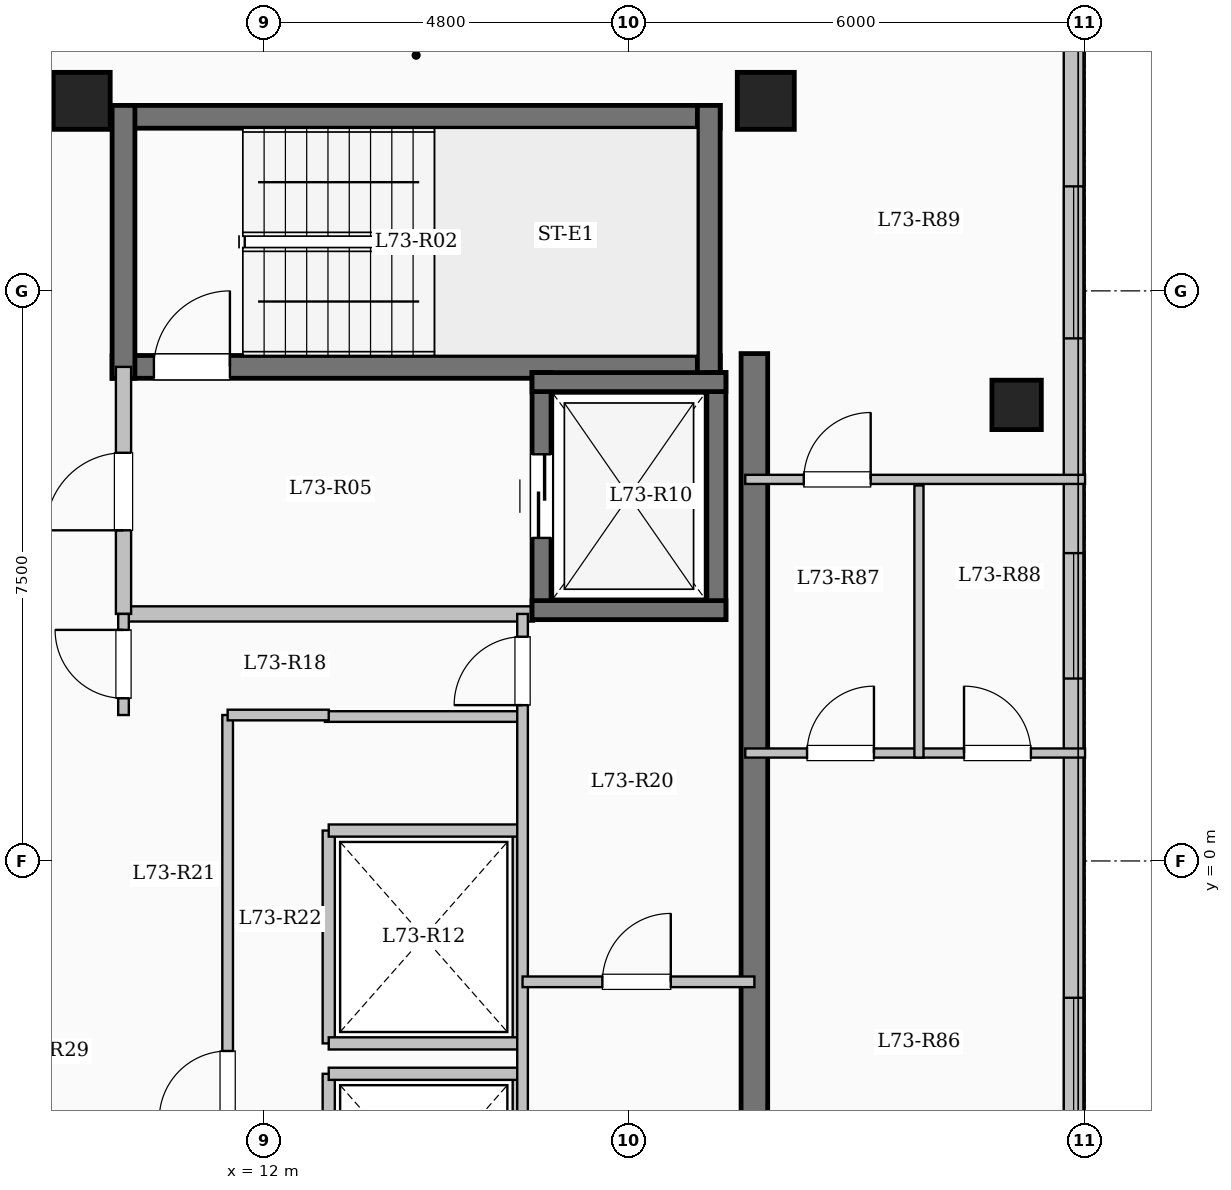
"""IFC4 building model, lengths in metres.
Left out: names, types, materials, properties, quantities, classifications, styles, units other than length and angle.
Written with IfcOpenShell. Run it as: python <this file> out.ifc"""

import sys

from ifc_helpers import new_model, si_unit, direction, frame, frame_2d, origin, origin_2d, place, context, subcontext, project, spatial, rectangle, extrude, element, fill, save


model = new_model("IFC4")
c1 = context("Model", 3, precision=1e-05, world=origin(), true_north=direction((0.0, 1.0)))
c2 = subcontext(c1, "Body", "Model", "MODEL_VIEW")
j1 = project(units=[si_unit("LENGTHUNIT", "METRE"), si_unit("PLANEANGLEUNIT", "RADIAN")], contexts=[c1])
p1 = place(None, origin())
s1 = spatial("IfcSite", under=j1, at=p1, CompositionType="ELEMENT")
p2 = place(p1, origin())
s2 = spatial("IfcBuilding", under=s1, at=p2, CompositionType="ELEMENT")
p3 = place(p2, frame((0.0, 0.0, 268.3)))
s3 = spatial("IfcBuildingStorey", under=s2, at=p3, CompositionType="ELEMENT", Elevation=268.3)
for number, where, z_axis, x_axis in (
    (1, (9.6, 10.0, 0.0), (0.0, 0.0, 1.0), (1.0, 0.0, 0.0)),
    (2, (18.6, 10.0, 0.0), (0.0, 0.0, 1.0), (1.0, 0.0, 0.0)),
):
    element("IfcColumn", number, at=place(p3, frame(where, z_axis=z_axis, x_axis=x_axis)), inside=s3, PredefinedType="COLUMN", context=c2, shape_type="SweptSolid", body=[
        extrude(rectangle(XDim=0.75, YDim=0.75, at=origin_2d()), origin(), (0.0, 0.0, 1.0), 3.35),
    ])
p4 = place(p3, frame((21.9, 6.0, 0.0), z_axis=(0.0, 0.0, 1.0), x_axis=(1.0, 0.0, 0.0)))
e3 = element("IfcColumn", 3, at=p4, inside=s3, PredefinedType="COLUMN", context=c2, shape_type="SweptSolid", body=[
    extrude(rectangle(XDim=0.65, YDim=0.65, at=origin_2d()), origin(), (0.0, 0.0, 1.0), 3.35),
])
p5 = place(p3, frame((22.65, 17.55, 0.0), z_axis=(0.0, 0.0, 1.0), x_axis=(0.0, -1.0, 0.0)))
e4 = element("IfcWall", 4, at=p5, inside=s3, PredefinedType="SOLIDWALL", context=c2, shape_type="SweptSolid", body=[
    extrude(rectangle(XDim=35.1, YDim=0.26, at=frame_2d((17.55, 0.0))), origin(), (0.0, 0.0, 1.0), 3.05),
])
p6 = place(p5, frame((1.525, 0.0, 0.9)))
e5 = element("IfcOpeningElement", 5, at=p6, cuts=e4, PredefinedType="OPENING", context=c2, shape_type="SweptSolid", body=[
    extrude(rectangle(XDim=2.0, YDim=1.7, at=frame_2d((1.0, 0.85))), frame((0.0, 0.14, 0.0), z_axis=(0.0, -1.0, 0.0), x_axis=(1.0, 0.0, 0.0)), (0.0, 0.0, 1.0), 0.28),
])
p7 = place(p5, frame((5.425, 0.0, 0.95)))
e6 = element("IfcOpeningElement", 6, at=p7, cuts=e4, PredefinedType="OPENING", context=c2, shape_type="SweptSolid", body=[
    extrude(rectangle(XDim=1.0, YDim=1.5, at=frame_2d((0.5, 0.75))), frame((0.0, 0.14, 0.0), z_axis=(0.0, -1.0, 0.0), x_axis=(1.0, 0.0, 0.0)), (0.0, 0.0, 1.0), 0.28),
])
p8 = place(p5, frame((8.675, 0.0, 0.9)))
e7 = element("IfcOpeningElement", 7, at=p8, cuts=e4, PredefinedType="OPENING", context=c2, shape_type="SweptSolid", body=[
    extrude(rectangle(XDim=2.0, YDim=1.7, at=frame_2d((1.0, 0.85))), frame((0.0, 0.14, 0.0), z_axis=(0.0, -1.0, 0.0), x_axis=(1.0, 0.0, 0.0)), (0.0, 0.0, 1.0), 0.28),
])
p9 = place(p5, frame((13.5, 0.0, 0.9)))
e8 = element("IfcOpeningElement", 8, at=p9, cuts=e4, PredefinedType="OPENING", context=c2, shape_type="SweptSolid", body=[
    extrude(rectangle(XDim=1.65, YDim=1.6, at=frame_2d((0.825, 0.8))), frame((0.0, 0.14, 0.0), z_axis=(0.0, -1.0, 0.0), x_axis=(1.0, 0.0, 0.0)), (0.0, 0.0, 1.0), 0.28),
])
p10 = place(p5, frame((19.35, 0.0, 0.9)))
e9 = element("IfcOpeningElement", 9, at=p10, cuts=e4, PredefinedType="OPENING", context=c2, shape_type="SweptSolid", body=[
    extrude(rectangle(XDim=2.2, YDim=1.75, at=frame_2d((1.1, 0.875))), frame((0.0, 0.14, 0.0), z_axis=(0.0, -1.0, 0.0), x_axis=(1.0, 0.0, 0.0)), (0.0, 0.0, 1.0), 0.28),
])
p11 = place(p5, frame((25.275, 0.0, 0.95)))
e10 = element("IfcOpeningElement", 10, at=p11, cuts=e4, PredefinedType="OPENING", context=c2, shape_type="SweptSolid", body=[
    extrude(rectangle(XDim=1.2, YDim=1.5, at=frame_2d((0.6, 0.75))), frame((0.0, 0.14, 0.0), z_axis=(0.0, -1.0, 0.0), x_axis=(1.0, 0.0, 0.0)), (0.0, 0.0, 1.0), 0.28),
])
p12 = place(p5, frame((29.925, 0.0, 0.9)))
e11 = element("IfcOpeningElement", 11, at=p12, cuts=e4, PredefinedType="OPENING", context=c2, shape_type="SweptSolid", body=[
    extrude(rectangle(XDim=2.2, YDim=1.75, at=frame_2d((1.1, 0.875))), frame((0.0, 0.14, 0.0), z_axis=(0.0, -1.0, 0.0), x_axis=(1.0, 0.0, 0.0)), (0.0, 0.0, 1.0), 0.28),
])
p13 = place(p3, frame((10.0, 9.79, 0.0), z_axis=(0.0, 0.0, 1.0), x_axis=(1.0, 0.0, 0.0)))
e12 = element("IfcWall", 12, at=p13, inside=s3, PredefinedType="SHEAR", context=c2, shape_type="SweptSolid", body=[
    extrude(rectangle(XDim=8.0, YDim=0.3, at=frame_2d((4.0, 0.0))), origin(), (0.0, 0.0, 1.0), 3.35),
])
p14 = place(p3, frame((10.0, 6.5, 0.0), z_axis=(0.0, 0.0, 1.0), x_axis=(1.0, 0.0, 0.0)))
e13 = element("IfcWall", 13, at=p14, inside=s3, PredefinedType="SHEAR", context=c2, shape_type="SweptSolid", body=[
    extrude(rectangle(XDim=8.0, YDim=0.3, at=frame_2d((4.0, 0.0))), origin(), (0.0, 0.0, 1.0), 3.35),
])
p15 = place(p14, frame((0.55, 0.0, 0.0)))
e14 = element("IfcOpeningElement", 14, at=p15, cuts=e13, PredefinedType="OPENING", context=c2, shape_type="SweptSolid", body=[
    extrude(rectangle(XDim=1.0, YDim=2.15, at=frame_2d((0.5, 1.075))), frame((0.0, 0.16, 0.0), z_axis=(0.0, -1.0, 0.0), x_axis=(1.0, 0.0, 0.0)), (0.0, 0.0, 1.0), 0.32),
])
for number, where, z_axis, x_axis in (
    (15, (10.15, 6.35, 0.0), (0.0, 0.0, 1.0), (0.0, 1.0, 0.0)),
    (16, (17.85, 6.35, 0.0), (0.0, 0.0, 1.0), (0.0, 1.0, 0.0)),
):
    element("IfcWall", number, at=place(p3, frame(where, z_axis=z_axis, x_axis=x_axis)), inside=s3, PredefinedType="SHEAR", context=c2, shape_type="SweptSolid", body=[
        extrude(rectangle(XDim=3.59, YDim=0.3, at=frame_2d((1.795, 0.0))), origin(), (0.0, 0.0, 1.0), 3.35),
    ])
p16 = place(p3, frame((10.15, 3.25, 0.0), z_axis=(0.0, 0.0, 1.0), x_axis=(1.0, 0.0, 0.0)))
e17 = element("IfcWall", 17, at=p16, inside=s3, PredefinedType="SOLIDWALL", context=c2, shape_type="SweptSolid", body=[
    extrude(rectangle(XDim=5.4, YDim=0.2, at=frame_2d((2.7, 0.0))), origin(), (0.0, 0.0, 1.0), 3.05),
])
p17 = place(p3, frame((10.15, 3.25, 0.0), z_axis=(0.0, 0.0, 1.0), x_axis=(0.0, 1.0, 0.0)))
e18 = element("IfcWall", 18, at=p17, inside=s3, PredefinedType="SOLIDWALL", context=c2, shape_type="SweptSolid", body=[
    extrude(rectangle(XDim=3.25, YDim=0.2, at=frame_2d((1.625, 0.0))), origin(), (0.0, 0.0, 1.0), 3.05),
])
p18 = place(p17, frame((1.1, 0.0, 0.0)))
e19 = element("IfcOpeningElement", 19, at=p18, cuts=e18, PredefinedType="OPENING", context=c2, shape_type="SweptSolid", body=[
    extrude(rectangle(XDim=1.02, YDim=2.15, at=frame_2d((0.51, 1.075))), frame((0.0, 0.11, 0.0), z_axis=(0.0, -1.0, 0.0), x_axis=(1.0, 0.0, 0.0)), (0.0, 0.0, 1.0), 0.22),
])
p19 = place(p3, frame((15.65, 3.175, 0.0), z_axis=(0.0, 0.0, 1.0), x_axis=(0.0, 1.0, 0.0)))
e20 = element("IfcWall", 20, at=p19, inside=s3, PredefinedType="SHEAR", context=c2, shape_type="SweptSolid", body=[
    extrude(rectangle(XDim=3.25, YDim=0.25, at=frame_2d((1.625, 0.0))), origin(), (0.0, 0.0, 1.0), 3.35),
])
p20 = place(p19, frame((1.075, 0.0, 0.0)))
e21 = element("IfcOpeningElement", 21, at=p20, cuts=e20, PredefinedType="OPENING", context=c2, shape_type="SweptSolid", body=[
    extrude(rectangle(XDim=1.1, YDim=2.15, at=frame_2d((0.55, 1.075))), frame((0.0, 0.135, 0.0), z_axis=(0.0, -1.0, 0.0), x_axis=(1.0, 0.0, 0.0)), (0.0, 0.0, 1.0), 0.27),
])
p21 = place(p3, frame((17.95, 3.175, 0.0), z_axis=(0.0, 0.0, 1.0), x_axis=(0.0, 1.0, 0.0)))
e22 = element("IfcWall", 22, at=p21, inside=s3, PredefinedType="SHEAR", context=c2, shape_type="SweptSolid", body=[
    extrude(rectangle(XDim=3.25, YDim=0.25, at=frame_2d((1.625, 0.0))), origin(), (0.0, 0.0, 1.0), 3.35),
])
for number, where, z_axis, x_axis in (
    (23, (15.525, 3.3, 0.0), (0.0, 0.0, 1.0), (1.0, 0.0, 0.0)),
    (24, (15.525, 6.3, 0.0), (0.0, 0.0, 1.0), (1.0, 0.0, 0.0)),
):
    element("IfcWall", number, at=place(p3, frame(where, z_axis=z_axis, x_axis=x_axis)), inside=s3, PredefinedType="SHEAR", context=c2, shape_type="SweptSolid", body=[
        extrude(rectangle(XDim=2.55, YDim=0.25, at=frame_2d((1.275, 0.0))), origin(), (0.0, 0.0, 1.0), 3.35),
    ])
for number, where, z_axis, x_axis in (
    (25, (12.85, -5.6, 0.0), (0.0, 0.0, 1.0), (0.0, 1.0, 0.0)),
    (26, (15.35, -5.6, 0.0), (0.0, 0.0, 1.0), (0.0, 1.0, 0.0)),
):
    element("IfcWall", number, at=place(p3, frame(where, z_axis=z_axis, x_axis=x_axis)), inside=s3, PredefinedType="SOLIDWALL", context=c2, shape_type="SweptSolid", body=[
        extrude(rectangle(XDim=2.8, YDim=0.16, at=frame_2d((1.4, 0.0))), origin(), (0.0, 0.0, 1.0), 3.05),
    ])
p22 = place(p3, frame((12.85, -2.8, 0.0), z_axis=(0.0, 0.0, 1.0), x_axis=(1.0, 0.0, 0.0)))
e27 = element("IfcWall", 27, at=p22, inside=s3, PredefinedType="SOLIDWALL", context=c2, shape_type="SweptSolid", body=[
    extrude(rectangle(XDim=2.5, YDim=0.16, at=frame_2d((1.25, 0.0))), origin(), (0.0, 0.0, 1.0), 3.05),
])
for number, where, z_axis, x_axis in (
    (28, (12.85, -2.4, 0.0), (0.0, 0.0, 1.0), (0.0, 1.0, 0.0)),
    (29, (15.35, -2.4, 0.0), (0.0, 0.0, 1.0), (0.0, 1.0, 0.0)),
):
    element("IfcWall", number, at=place(p3, frame(where, z_axis=z_axis, x_axis=x_axis)), inside=s3, PredefinedType="SOLIDWALL", context=c2, shape_type="SweptSolid", body=[
        extrude(rectangle(XDim=2.8, YDim=0.16, at=frame_2d((1.4, 0.0))), origin(), (0.0, 0.0, 1.0), 3.05),
    ])
for number, where, z_axis, x_axis in (
    (30, (12.85, -2.4, 0.0), (0.0, 0.0, 1.0), (1.0, 0.0, 0.0)),
    (31, (12.85, 0.4, 0.0), (0.0, 0.0, 1.0), (1.0, 0.0, 0.0)),
):
    element("IfcWall", number, at=place(p3, frame(where, z_axis=z_axis, x_axis=x_axis)), inside=s3, PredefinedType="SOLIDWALL", context=c2, shape_type="SweptSolid", body=[
        extrude(rectangle(XDim=2.5, YDim=0.16, at=frame_2d((1.25, 0.0))), origin(), (0.0, 0.0, 1.0), 3.05),
    ])
p23 = place(p3, frame((18.45, -7.375, 0.0), z_axis=(0.0, 0.0, 1.0), x_axis=(0.0, 1.0, 0.0)))
e32 = element("IfcWall", 32, at=p23, inside=s3, PredefinedType="SHEAR", context=c2, shape_type="SweptSolid", body=[
    extrude(rectangle(XDim=14.05, YDim=0.35, at=frame_2d((7.025, 0.0))), origin(), (0.0, 0.0, 1.0), 3.35),
])
p24 = place(p3, frame((12.8, 1.9, 0.0), z_axis=(0.0, 0.0, 1.0), x_axis=(1.0, 0.0, 0.0)))
e33 = element("IfcWall", 33, at=p24, inside=s3, PredefinedType="PARTITIONING", context=c2, shape_type="SweptSolid", body=[
    extrude(rectangle(XDim=2.6, YDim=0.14, at=frame_2d((1.3, 0.0))), origin(), (0.0, 0.0, 1.0), 3.05),
])
p25 = place(p3, frame((10.15, 1.92, 0.0), z_axis=(0.0, 0.0, 1.0), x_axis=(0.0, 1.0, 0.0)))
e34 = element("IfcWall", 34, at=p25, inside=s3, PredefinedType="PARTITIONING", context=c2, shape_type="SweptSolid", body=[
    extrude(rectangle(XDim=1.33, YDim=0.14, at=frame_2d((0.665, 0.0))), origin(), (0.0, 0.0, 1.0), 3.05),
])
p26 = place(p25, frame((0.22, 0.0, 0.0)))
e35 = element("IfcOpeningElement", 35, at=p26, cuts=e34, PredefinedType="OPENING", context=c2, shape_type="SweptSolid", body=[
    extrude(rectangle(XDim=0.9, YDim=2.08, at=frame_2d((0.45, 1.04))), frame((0.0, 0.08, 0.0), z_axis=(0.0, -1.0, 0.0), x_axis=(1.0, 0.0, 0.0)), (0.0, 0.0, 1.0), 0.16),
])
p27 = place(p3, frame((15.4, -7.2, 0.0), z_axis=(0.0, 0.0, 1.0), x_axis=(0.0, 1.0, 0.0)))
e36 = element("IfcWall", 36, at=p27, inside=s3, PredefinedType="PARTITIONING", context=c2, shape_type="SweptSolid", body=[
    extrude(rectangle(XDim=10.45, YDim=0.14, at=frame_2d((5.225, 0.0))), origin(), (0.0, 0.0, 1.0), 3.05),
])
p28 = place(p27, frame((9.25, 0.0, 0.0)))
e37 = element("IfcOpeningElement", 37, at=p28, cuts=e36, PredefinedType="OPENING", context=c2, shape_type="SweptSolid", body=[
    extrude(rectangle(XDim=0.9, YDim=2.08, at=frame_2d((0.45, 1.04))), frame((0.0, 0.08, 0.0), z_axis=(0.0, -1.0, 0.0), x_axis=(1.0, 0.0, 0.0)), (0.0, 0.0, 1.0), 0.16),
])
p29 = place(p3, frame((15.4, -1.59, 0.0), z_axis=(0.0, 0.0, 1.0), x_axis=(1.0, 0.0, 0.0)))
e38 = element("IfcWall", 38, at=p29, inside=s3, PredefinedType="PARTITIONING", context=c2, shape_type="SweptSolid", body=[
    extrude(rectangle(XDim=3.05, YDim=0.14, at=frame_2d((1.525, 0.0))), origin(), (0.0, 0.0, 1.0), 3.05),
])
p30 = place(p29, frame((1.05, 0.0, 0.0)))
e39 = element("IfcOpeningElement", 39, at=p30, cuts=e38, PredefinedType="OPENING", context=c2, shape_type="SweptSolid", body=[
    extrude(rectangle(XDim=0.9, YDim=2.08, at=frame_2d((0.45, 1.04))), frame((0.0, 0.08, 0.0), z_axis=(0.0, -1.0, 0.0), x_axis=(1.0, 0.0, 0.0)), (0.0, 0.0, 1.0), 0.16),
])
p31 = place(p3, frame((11.52, -7.2, 0.0), z_axis=(0.0, 0.0, 1.0), x_axis=(0.0, 1.0, 0.0)))
e40 = element("IfcWall", 40, at=p31, inside=s3, PredefinedType="PARTITIONING", context=c2, shape_type="SweptSolid", body=[
    extrude(rectangle(XDim=9.12, YDim=0.14, at=frame_2d((4.56, 0.0))), origin(), (0.0, 0.0, 1.0), 3.05),
])
p32 = place(p31, frame((3.8, 0.0, 0.0)))
e41 = element("IfcOpeningElement", 41, at=p32, cuts=e40, PredefinedType="OPENING", context=c2, shape_type="SweptSolid", body=[
    extrude(rectangle(XDim=0.9, YDim=2.08, at=frame_2d((0.45, 1.04))), frame((0.0, 0.08, 0.0), z_axis=(0.0, -1.0, 0.0), x_axis=(1.0, 0.0, 0.0)), (0.0, 0.0, 1.0), 0.16),
])
p33 = place(p3, frame((11.52, 1.92, 0.0), z_axis=(0.0, 0.0, 1.0), x_axis=(1.0, 0.0, 0.0)))
e42 = element("IfcWall", 42, at=p33, inside=s3, PredefinedType="PARTITIONING", context=c2, shape_type="SweptSolid", body=[
    extrude(rectangle(XDim=1.33, YDim=0.14, at=frame_2d((0.665, 0.0))), origin(), (0.0, 0.0, 1.0), 3.05),
])
p34 = place(p3, frame((18.33, 1.42, 0.0), z_axis=(0.0, 0.0, 1.0), x_axis=(1.0, 0.0, 0.0)))
e43 = element("IfcWall", 43, at=p34, inside=s3, PredefinedType="PARTITIONING", context=c2, shape_type="SweptSolid", body=[
    extrude(rectangle(XDim=4.47, YDim=0.12, at=frame_2d((2.235, 0.0))), origin(), (0.0, 0.0, 1.0), 3.05),
])
p35 = place(p34, frame((0.813, 0.0, 0.0)))
e44 = element("IfcOpeningElement", 44, at=p35, cuts=e43, PredefinedType="OPENING", context=c2, shape_type="SweptSolid", body=[
    extrude(rectangle(XDim=0.88, YDim=2.1, at=frame_2d((0.44, 1.05))), frame((0.0, 0.07, 0.0), z_axis=(0.0, -1.0, 0.0), x_axis=(1.0, 0.0, 0.0)), (0.0, 0.0, 1.0), 0.14),
])
p36 = place(p34, frame((2.878, 0.0, 0.0)))
e45 = element("IfcOpeningElement", 45, at=p36, cuts=e43, PredefinedType="OPENING", context=c2, shape_type="SweptSolid", body=[
    extrude(rectangle(XDim=0.88, YDim=2.1, at=frame_2d((0.44, 1.05))), frame((0.0, 0.07, 0.0), z_axis=(0.0, -1.0, 0.0), x_axis=(1.0, 0.0, 0.0)), (0.0, 0.0, 1.0), 0.14),
])
p37 = place(p3, frame((18.33, 5.02, 0.0), z_axis=(0.0, 0.0, 1.0), x_axis=(1.0, 0.0, 0.0)))
e46 = element("IfcWall", 46, at=p37, inside=s3, PredefinedType="PARTITIONING", context=c2, shape_type="SweptSolid", body=[
    extrude(rectangle(XDim=4.47, YDim=0.12, at=frame_2d((2.235, 0.0))), origin(), (0.0, 0.0, 1.0), 3.05),
])
p38 = place(p37, frame((0.77, 0.0, 0.0)))
e47 = element("IfcOpeningElement", 47, at=p38, cuts=e46, PredefinedType="OPENING", context=c2, shape_type="SweptSolid", body=[
    extrude(rectangle(XDim=0.88, YDim=2.1, at=frame_2d((0.44, 1.05))), frame((0.0, 0.07, 0.0), z_axis=(0.0, -1.0, 0.0), x_axis=(1.0, 0.0, 0.0)), (0.0, 0.0, 1.0), 0.14),
])
p39 = place(p3, frame((20.615, 1.36, 0.0), z_axis=(0.0, 0.0, 1.0), x_axis=(0.0, 1.0, 0.0)))
e48 = element("IfcWall", 48, at=p39, inside=s3, PredefinedType="PARTITIONING", context=c2, shape_type="SweptSolid", body=[
    extrude(rectangle(XDim=3.58, YDim=0.12, at=frame_2d((1.79, 0.0))), origin(), (0.0, 0.0, 1.0), 3.05),
])
p40 = place(p8, origin())
e49 = element("IfcWindow", 49, at=p40, inside=s3, PartitioningType="SINGLE_PANEL", PredefinedType="WINDOW", context=c2, shape_type="SweptSolid", body=[
    extrude(rectangle(XDim=2.0, YDim=1.7, at=frame_2d((1.0, 0.85))), frame((0.0, 0.03, 0.0), z_axis=(0.0, -1.0, 0.0), x_axis=(1.0, 0.0, 0.0)), (0.0, 0.0, 1.0), 0.06),
])
fill(e7, e49)
p41 = place(p9, origin())
e50 = element("IfcWindow", 50, at=p41, inside=s3, PartitioningType="SINGLE_PANEL", PredefinedType="WINDOW", context=c2, shape_type="SweptSolid", body=[
    extrude(rectangle(XDim=1.65, YDim=1.6, at=frame_2d((0.825, 0.8))), frame((0.0, 0.03, 0.0), z_axis=(0.0, -1.0, 0.0), x_axis=(1.0, 0.0, 0.0)), (0.0, 0.0, 1.0), 0.06),
])
fill(e8, e50)
p42 = place(p10, origin())
e51 = element("IfcWindow", 51, at=p42, inside=s3, PartitioningType="SINGLE_PANEL", PredefinedType="WINDOW", context=c2, shape_type="SweptSolid", body=[
    extrude(rectangle(XDim=2.2, YDim=1.75, at=frame_2d((1.1, 0.875))), frame((0.0, 0.03, 0.0), z_axis=(0.0, -1.0, 0.0), x_axis=(1.0, 0.0, 0.0)), (0.0, 0.0, 1.0), 0.06),
])
fill(e9, e51)
p43 = place(p15, origin())
e52 = element("IfcDoor", 52, at=p43, inside=s3, OperationType="SINGLE_SWING_RIGHT", PredefinedType="DOOR", context=c2, shape_type="SweptSolid", body=[
    extrude(rectangle(XDim=1.0, YDim=2.15, at=frame_2d((0.5, 1.075))), frame((0.0, 0.025, 0.0), z_axis=(0.0, -1.0, 0.0), x_axis=(1.0, 0.0, 0.0)), (0.0, 0.0, 1.0), 0.05),
])
fill(e14, e52)
p44 = place(p18, origin())
e53 = element("IfcDoor", 53, at=p44, inside=s3, OperationType="SINGLE_SWING_LEFT", PredefinedType="DOOR", context=c2, shape_type="SweptSolid", body=[
    extrude(rectangle(XDim=1.02, YDim=2.15, at=frame_2d((0.51, 1.075))), frame((0.0, 0.025, 0.0), z_axis=(0.0, -1.0, 0.0), x_axis=(1.0, 0.0, 0.0)), (0.0, 0.0, 1.0), 0.05),
])
fill(e19, e53)
p45 = place(p20, origin())
e54 = element("IfcDoor", 54, at=p45, inside=s3, OperationType="SLIDING_TO_LEFT", PredefinedType="DOOR", context=c2, shape_type="SweptSolid", body=[
    extrude(rectangle(XDim=1.1, YDim=2.15, at=frame_2d((0.55, 1.075))), frame((0.0, 0.025, 0.0), z_axis=(0.0, -1.0, 0.0), x_axis=(1.0, 0.0, 0.0)), (0.0, 0.0, 1.0), 0.05),
])
fill(e21, e54)
p46 = place(p26, origin())
e55 = element("IfcDoor", 55, at=p46, inside=s3, OperationType="SINGLE_SWING_RIGHT", PredefinedType="DOOR", context=c2, shape_type="SweptSolid", body=[
    extrude(rectangle(XDim=0.9, YDim=2.08, at=frame_2d((0.45, 1.04))), frame((0.0, 0.025, 0.0), z_axis=(0.0, -1.0, 0.0), x_axis=(1.0, 0.0, 0.0)), (0.0, 0.0, 1.0), 0.05),
])
fill(e35, e55)
p47 = place(p28, origin())
e56 = element("IfcDoor", 56, at=p47, inside=s3, OperationType="SINGLE_SWING_LEFT", PredefinedType="DOOR", context=c2, shape_type="SweptSolid", body=[
    extrude(rectangle(XDim=0.9, YDim=2.08, at=frame_2d((0.45, 1.04))), frame((0.0, 0.025, 0.0), z_axis=(0.0, -1.0, 0.0), x_axis=(1.0, 0.0, 0.0)), (0.0, 0.0, 1.0), 0.05),
])
fill(e37, e56)
p48 = place(p30, origin())
e57 = element("IfcDoor", 57, at=p48, inside=s3, OperationType="SINGLE_SWING_RIGHT", PredefinedType="DOOR", context=c2, shape_type="SweptSolid", body=[
    extrude(rectangle(XDim=0.9, YDim=2.08, at=frame_2d((0.45, 1.04))), frame((0.0, 0.025, 0.0), z_axis=(0.0, -1.0, 0.0), x_axis=(1.0, 0.0, 0.0)), (0.0, 0.0, 1.0), 0.05),
])
fill(e39, e57)
p49 = place(p32, origin())
e58 = element("IfcDoor", 58, at=p49, inside=s3, OperationType="SINGLE_SWING_LEFT", PredefinedType="DOOR", context=c2, shape_type="SweptSolid", body=[
    extrude(rectangle(XDim=0.9, YDim=2.08, at=frame_2d((0.45, 1.04))), frame((0.0, 0.025, 0.0), z_axis=(0.0, -1.0, 0.0), x_axis=(1.0, 0.0, 0.0)), (0.0, 0.0, 1.0), 0.05),
])
fill(e41, e58)
p50 = place(p35, origin())
e59 = element("IfcDoor", 59, at=p50, inside=s3, OperationType="SINGLE_SWING_RIGHT", PredefinedType="DOOR", context=c2, shape_type="SweptSolid", body=[
    extrude(rectangle(XDim=0.88, YDim=2.1, at=frame_2d((0.44, 1.05))), frame((0.0, 0.025, 0.0), z_axis=(0.0, -1.0, 0.0), x_axis=(1.0, 0.0, 0.0)), (0.0, 0.0, 1.0), 0.05),
])
fill(e44, e59)
p51 = place(p36, origin())
e60 = element("IfcDoor", 60, at=p51, inside=s3, OperationType="SINGLE_SWING_LEFT", PredefinedType="DOOR", context=c2, shape_type="SweptSolid", body=[
    extrude(rectangle(XDim=0.88, YDim=2.1, at=frame_2d((0.44, 1.05))), frame((0.0, 0.025, 0.0), z_axis=(0.0, -1.0, 0.0), x_axis=(1.0, 0.0, 0.0)), (0.0, 0.0, 1.0), 0.05),
])
fill(e45, e60)
p52 = place(p38, origin())
e61 = element("IfcDoor", 61, at=p52, inside=s3, OperationType="SINGLE_SWING_RIGHT", PredefinedType="DOOR", context=c2, shape_type="SweptSolid", body=[
    extrude(rectangle(XDim=0.88, YDim=2.1, at=frame_2d((0.44, 1.05))), frame((0.0, 0.025, 0.0), z_axis=(0.0, -1.0, 0.0), x_axis=(1.0, 0.0, 0.0)), (0.0, 0.0, 1.0), 0.05),
])
fill(e47, e61)
save(model, sys.argv[1])
